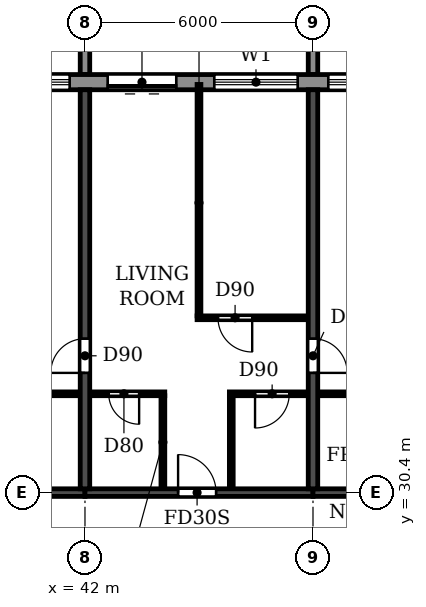
"""IFC4 building model, lengths in metres.
Left out: names, types, materials, properties, quantities, classifications, styles, units other than length and angle.
Written with IfcOpenShell. Run it as: python <this file> out.ifc"""

import sys

from ifc_helpers import new_model, si_unit, direction, frame, frame_2d, origin, place, context, subcontext, project, spatial, polyline, rectangle, outline, extrude, source, transform, mapped, element, fill, save


model = new_model("IFC4")
c1 = context("Model", 3, precision=1e-05, world=origin(), true_north=direction((0.0, 1.0)))
c2 = subcontext(c1, "Body", "Model", "MODEL_VIEW")
j1 = project(units=[si_unit("LENGTHUNIT", "METRE"), si_unit("PLANEANGLEUNIT", "RADIAN")], contexts=[c1])
p1 = place(None, origin())
s1 = spatial("IfcSite", under=j1, at=p1, CompositionType="ELEMENT")
p2 = place(p1, origin())
s2 = spatial("IfcBuilding", under=s1, at=p2, CompositionType="ELEMENT")
p3 = place(p2, frame((0.0, 0.0, 191.7)))
s3 = spatial("IfcBuildingStorey", under=s2, at=p3, CompositionType="ELEMENT", Elevation=191.7)
p4 = place(p3, frame((42.0, 30.5, 0.0), z_axis=(0.0, 0.0, 1.0), x_axis=(0.0, 1.0, 0.0)))
e1 = element("IfcWall", 1, at=p4, inside=s3, PredefinedType="SHEAR", context=c2, shape_type="SweptSolid", body=[
    extrude(rectangle(XDim=10.5, YDim=0.25, at=frame_2d((5.25, 0.0))), origin(), (0.0, 0.0, 1.0), 3.08),
])
p5 = place(p4, frame((3.05, 0.0, 0.0)))
e2 = element("IfcOpeningElement", 2, at=p5, cuts=e1, PredefinedType="OPENING", context=c2, shape_type="SweptSolid", body=[
    extrude(rectangle(XDim=0.9, YDim=2.1, at=frame_2d((0.45, 1.05))), frame((0.0, 0.135, 0.0), z_axis=(0.0, -1.0, 0.0), x_axis=(1.0, 0.0, 0.0)), (0.0, 0.0, 1.0), 0.27),
])
p6 = place(p3, frame((48.0, 30.5, 0.0), z_axis=(0.0, 0.0, 1.0), x_axis=(0.0, 1.0, 0.0)))
e3 = element("IfcWall", 3, at=p6, inside=s3, PredefinedType="SHEAR", context=c2, shape_type="SweptSolid", body=[
    extrude(rectangle(XDim=10.5, YDim=0.25, at=frame_2d((5.25, 0.0))), origin(), (0.0, 0.0, 1.0), 3.08),
])
p7 = place(p6, frame((3.05, 0.0, 0.0)))
e4 = element("IfcOpeningElement", 4, at=p7, cuts=e3, PredefinedType="OPENING", context=c2, shape_type="SweptSolid", body=[
    extrude(rectangle(XDim=0.9, YDim=2.1, at=frame_2d((0.45, 1.05))), frame((0.0, 0.135, 0.0), z_axis=(0.0, -1.0, 0.0), x_axis=(1.0, 0.0, 0.0)), (0.0, 0.0, 1.0), 0.27),
])
p8 = place(p3, frame((36.0, 30.4, 0.0), z_axis=(0.0, 0.0, 1.0), x_axis=(1.0, 0.0, 0.0)))
e5 = element("IfcWall", 5, at=p8, inside=s3, PredefinedType="SHEAR", context=c2, shape_type="SweptSolid", body=[
    extrude(rectangle(XDim=6.0, YDim=0.2, at=frame_2d((3.0, 0.0))), origin(), (0.0, 0.0, 1.0), 2.48),
])
p9 = place(p3, frame((42.0, 30.4, 0.0), z_axis=(0.0, 0.0, 1.0), x_axis=(1.0, 0.0, 0.0)))
e6 = element("IfcWall", 6, at=p9, inside=s3, PredefinedType="SHEAR", context=c2, shape_type="SweptSolid", body=[
    extrude(rectangle(XDim=6.0, YDim=0.2, at=frame_2d((3.0, 0.0))), origin(), (0.0, 0.0, 1.0), 2.48),
])
p10 = place(p9, frame((2.45, 0.0, 0.0)))
e7 = element("IfcOpeningElement", 7, at=p10, cuts=e6, PredefinedType="OPENING", context=c2, shape_type="SweptSolid", body=[
    extrude(rectangle(XDim=1.0, YDim=2.1, at=frame_2d((0.5, 1.05))), frame((0.0, 0.11, 0.0), z_axis=(0.0, -1.0, 0.0), x_axis=(1.0, 0.0, 0.0)), (0.0, 0.0, 1.0), 0.22),
])
p11 = place(p3, frame((48.0, 30.4, 0.0), z_axis=(0.0, 0.0, 1.0), x_axis=(1.0, 0.0, 0.0)))
e8 = element("IfcWall", 8, at=p11, inside=s3, PredefinedType="SHEAR", context=c2, shape_type="SweptSolid", body=[
    extrude(rectangle(XDim=6.0, YDim=0.2, at=frame_2d((3.0, 0.0))), origin(), (0.0, 0.0, 1.0), 2.48),
])
p12 = place(p3, frame((79.317, 41.2, 0.0), z_axis=(0.0, 0.0, 1.0), x_axis=(-1.0, 0.0, 0.0)))
e9 = element("IfcWall", 9, at=p12, inside=s3, PredefinedType="STANDARD", context=c2, shape_type="SweptSolid", body=[
    extrude(rectangle(XDim=56.634, YDim=0.4, at=frame_2d((28.317, 0.0))), origin(), (0.0, 0.0, 1.0), 3.08),
])
p13 = place(p12, frame((52.917, 0.0, 0.0)))
e10 = element("IfcOpeningElement", 10, at=p13, cuts=e9, PredefinedType="OPENING", context=c2, shape_type="SweptSolid", body=[
    extrude(rectangle(XDim=1.8, YDim=2.4, at=frame_2d((0.9, 1.2))), frame((0.0, 0.21, 0.0), z_axis=(0.0, -1.0, 0.0), x_axis=(1.0, 0.0, 0.0)), (0.0, 0.0, 1.0), 0.42),
])
p14 = place(p12, frame((49.717, 0.0, 0.9)))
e11 = element("IfcOpeningElement", 11, at=p14, cuts=e9, PredefinedType="OPENING", context=c2, shape_type="SweptSolid", body=[
    extrude(rectangle(XDim=2.2, YDim=1.5, at=frame_2d((1.1, 0.75))), frame((0.0, 0.21, 0.0), z_axis=(0.0, -1.0, 0.0), x_axis=(1.0, 0.0, 0.0)), (0.0, 0.0, 1.0), 0.42),
])
p15 = place(p12, frame((46.917, 0.0, 0.0)))
e12 = element("IfcOpeningElement", 12, at=p15, cuts=e9, PredefinedType="OPENING", context=c2, shape_type="SweptSolid", body=[
    extrude(rectangle(XDim=1.8, YDim=2.4, at=frame_2d((0.9, 1.2))), frame((0.0, 0.21, 0.0), z_axis=(0.0, -1.0, 0.0), x_axis=(1.0, 0.0, 0.0)), (0.0, 0.0, 1.0), 0.42),
])
p16 = place(p12, frame((43.717, 0.0, 0.9)))
e13 = element("IfcOpeningElement", 13, at=p16, cuts=e9, PredefinedType="OPENING", context=c2, shape_type="SweptSolid", body=[
    extrude(rectangle(XDim=2.2, YDim=1.5, at=frame_2d((1.1, 0.75))), frame((0.0, 0.21, 0.0), z_axis=(0.0, -1.0, 0.0), x_axis=(1.0, 0.0, 0.0)), (0.0, 0.0, 1.0), 0.42),
])
p17 = place(p12, frame((40.717, 0.0, 0.9)))
e14 = element("IfcOpeningElement", 14, at=p17, cuts=e9, PredefinedType="OPENING", context=c2, shape_type="SweptSolid", body=[
    extrude(rectangle(XDim=2.2, YDim=1.5, at=frame_2d((1.1, 0.75))), frame((0.0, 0.21, 0.0), z_axis=(0.0, -1.0, 0.0), x_axis=(1.0, 0.0, 0.0)), (0.0, 0.0, 1.0), 0.42),
])
p18 = place(p12, frame((37.717, 0.0, 0.9)))
e15 = element("IfcOpeningElement", 15, at=p18, cuts=e9, PredefinedType="OPENING", context=c2, shape_type="SweptSolid", body=[
    extrude(rectangle(XDim=2.2, YDim=1.5, at=frame_2d((1.1, 0.75))), frame((0.0, 0.21, 0.0), z_axis=(0.0, -1.0, 0.0), x_axis=(1.0, 0.0, 0.0)), (0.0, 0.0, 1.0), 0.42),
])
p19 = place(p12, frame((34.917, 0.0, 0.0)))
e16 = element("IfcOpeningElement", 16, at=p19, cuts=e9, PredefinedType="OPENING", context=c2, shape_type="SweptSolid", body=[
    extrude(rectangle(XDim=1.8, YDim=2.4, at=frame_2d((0.9, 1.2))), frame((0.0, 0.21, 0.0), z_axis=(0.0, -1.0, 0.0), x_axis=(1.0, 0.0, 0.0)), (0.0, 0.0, 1.0), 0.42),
])
p20 = place(p12, frame((31.717, 0.0, 0.9)))
e17 = element("IfcOpeningElement", 17, at=p20, cuts=e9, PredefinedType="OPENING", context=c2, shape_type="SweptSolid", body=[
    extrude(rectangle(XDim=2.2, YDim=1.5, at=frame_2d((1.1, 0.75))), frame((0.0, 0.21, 0.0), z_axis=(0.0, -1.0, 0.0), x_axis=(1.0, 0.0, 0.0)), (0.0, 0.0, 1.0), 0.42),
])
p21 = place(p12, frame((28.717, 0.0, 0.9)))
e18 = element("IfcOpeningElement", 18, at=p21, cuts=e9, PredefinedType="OPENING", context=c2, shape_type="SweptSolid", body=[
    extrude(rectangle(XDim=2.2, YDim=1.5, at=frame_2d((1.1, 0.75))), frame((0.0, 0.21, 0.0), z_axis=(0.0, -1.0, 0.0), x_axis=(1.0, 0.0, 0.0)), (0.0, 0.0, 1.0), 0.42),
])
p22 = place(p12, frame((25.717, 0.0, 0.9)))
e19 = element("IfcOpeningElement", 19, at=p22, cuts=e9, PredefinedType="OPENING", context=c2, shape_type="SweptSolid", body=[
    extrude(rectangle(XDim=2.2, YDim=1.5, at=frame_2d((1.1, 0.75))), frame((0.0, 0.21, 0.0), z_axis=(0.0, -1.0, 0.0), x_axis=(1.0, 0.0, 0.0)), (0.0, 0.0, 1.0), 0.42),
])
p23 = place(p12, frame((22.917, 0.0, 0.0)))
e20 = element("IfcOpeningElement", 20, at=p23, cuts=e9, PredefinedType="OPENING", context=c2, shape_type="SweptSolid", body=[
    extrude(rectangle(XDim=1.8, YDim=2.4, at=frame_2d((0.9, 1.2))), frame((0.0, 0.21, 0.0), z_axis=(0.0, -1.0, 0.0), x_axis=(1.0, 0.0, 0.0)), (0.0, 0.0, 1.0), 0.42),
])
p24 = place(p12, frame((19.717, 0.0, 0.9)))
e21 = element("IfcOpeningElement", 21, at=p24, cuts=e9, PredefinedType="OPENING", context=c2, shape_type="SweptSolid", body=[
    extrude(rectangle(XDim=2.2, YDim=1.5, at=frame_2d((1.1, 0.75))), frame((0.0, 0.21, 0.0), z_axis=(0.0, -1.0, 0.0), x_axis=(1.0, 0.0, 0.0)), (0.0, 0.0, 1.0), 0.42),
])
p25 = place(p12, frame((16.717, 0.0, 0.9)))
e22 = element("IfcOpeningElement", 22, at=p25, cuts=e9, PredefinedType="OPENING", context=c2, shape_type="SweptSolid", body=[
    extrude(rectangle(XDim=2.2, YDim=1.5, at=frame_2d((1.1, 0.75))), frame((0.0, 0.21, 0.0), z_axis=(0.0, -1.0, 0.0), x_axis=(1.0, 0.0, 0.0)), (0.0, 0.0, 1.0), 0.42),
])
p26 = place(p12, frame((13.717, 0.0, 0.9)))
e23 = element("IfcOpeningElement", 23, at=p26, cuts=e9, PredefinedType="OPENING", context=c2, shape_type="SweptSolid", body=[
    extrude(rectangle(XDim=2.2, YDim=1.5, at=frame_2d((1.1, 0.75))), frame((0.0, 0.21, 0.0), z_axis=(0.0, -1.0, 0.0), x_axis=(1.0, 0.0, 0.0)), (0.0, 0.0, 1.0), 0.42),
])
p27 = place(p12, frame((10.717, 0.0, 0.9)))
e24 = element("IfcOpeningElement", 24, at=p27, cuts=e9, PredefinedType="OPENING", context=c2, shape_type="SweptSolid", body=[
    extrude(rectangle(XDim=2.2, YDim=1.5, at=frame_2d((1.1, 0.75))), frame((0.0, 0.21, 0.0), z_axis=(0.0, -1.0, 0.0), x_axis=(1.0, 0.0, 0.0)), (0.0, 0.0, 1.0), 0.42),
])
p28 = place(p12, frame((7.917, 0.0, 0.0)))
e25 = element("IfcOpeningElement", 25, at=p28, cuts=e9, PredefinedType="OPENING", context=c2, shape_type="SweptSolid", body=[
    extrude(rectangle(XDim=1.8, YDim=2.4, at=frame_2d((0.9, 1.2))), frame((0.0, 0.21, 0.0), z_axis=(0.0, -1.0, 0.0), x_axis=(1.0, 0.0, 0.0)), (0.0, 0.0, 1.0), 0.42),
])
p29 = place(p12, frame((4.717, 0.0, 0.9)))
e26 = element("IfcOpeningElement", 26, at=p29, cuts=e9, PredefinedType="OPENING", context=c2, shape_type="SweptSolid", body=[
    extrude(rectangle(XDim=2.2, YDim=1.5, at=frame_2d((1.1, 0.75))), frame((0.0, 0.21, 0.0), z_axis=(0.0, -1.0, 0.0), x_axis=(1.0, 0.0, 0.0)), (0.0, 0.0, 1.0), 0.42),
])
p30 = place(p12, frame((1.917, 0.0, 0.0)))
e27 = element("IfcOpeningElement", 27, at=p30, cuts=e9, PredefinedType="OPENING", context=c2, shape_type="SweptSolid", body=[
    extrude(rectangle(XDim=1.8, YDim=2.4, at=frame_2d((0.9, 1.2))), frame((0.0, 0.21, 0.0), z_axis=(0.0, -1.0, 0.0), x_axis=(1.0, 0.0, 0.0)), (0.0, 0.0, 1.0), 0.42),
])
m1 = source(origin(), c2, "Body", "SweptSolid", [
    extrude(outline(polyline([(0.0, 0.0), (0.25, 0.0), (0.25, 3.1), (0.0, 3.1), (0.0, 0.0)])), origin(), (0.0, 0.0, 1.0), 3.1),
])
for number, where in (
    (28, (41.875, 41.4, 0.0)),
    (29, (47.875, 41.4, 0.0)),
):
    element("IfcWall", number, at=place(p3, frame(where)), inside=s3, PredefinedType="STANDARD", context=c2, shape_type="MappedRepresentation", body=[
        mapped(m1, transform((0.0, 0.0, 0.0))),
    ])
p31 = place(p3, frame((38.9, 33.0, 0.0), z_axis=(0.0, 0.0, 1.0), x_axis=(1.0, 0.0, 0.0)))
e30 = element("IfcWall", 30, at=p31, inside=s3, PredefinedType="PARTITIONING", context=c2, shape_type="SweptSolid", body=[
    extrude(rectangle(XDim=2.965, YDim=0.1, at=frame_2d((1.482, 0.0))), origin(), (0.0, 0.0, 1.0), 3.08),
])
p32 = place(p31, frame((1.2, 0.0, 0.0)))
e31 = element("IfcOpeningElement", 31, at=p32, cuts=e30, PredefinedType="OPENING", context=c2, shape_type="SweptSolid", body=[
    extrude(rectangle(XDim=0.8, YDim=2.1, at=frame_2d((0.4, 1.05))), frame((0.0, 0.06, 0.0), z_axis=(0.0, -1.0, 0.0), x_axis=(1.0, 0.0, 0.0)), (0.0, 0.0, 1.0), 0.12),
])
p33 = place(p3, frame((42.135, 33.0, 0.0), z_axis=(0.0, 0.0, 1.0), x_axis=(1.0, 0.0, 0.0)))
e32 = element("IfcWall", 32, at=p33, inside=s3, PredefinedType="PARTITIONING", context=c2, shape_type="SweptSolid", body=[
    extrude(rectangle(XDim=1.965, YDim=0.1, at=frame_2d((0.982, 0.0))), origin(), (0.0, 0.0, 1.0), 3.08),
])
p34 = place(p33, frame((0.49, 0.0, 0.0)))
e33 = element("IfcOpeningElement", 33, at=p34, cuts=e32, PredefinedType="OPENING", context=c2, shape_type="SweptSolid", body=[
    extrude(rectangle(XDim=0.8, YDim=2.1, at=frame_2d((0.4, 1.05))), frame((0.0, 0.06, 0.0), z_axis=(0.0, -1.0, 0.0), x_axis=(1.0, 0.0, 0.0)), (0.0, 0.0, 1.0), 0.12),
])
p35 = place(p3, frame((45.8, 33.0, 0.0), z_axis=(0.0, 0.0, 1.0), x_axis=(1.0, 0.0, 0.0)))
e34 = element("IfcWall", 34, at=p35, inside=s3, PredefinedType="PARTITIONING", context=c2, shape_type="SweptSolid", body=[
    extrude(rectangle(XDim=2.065, YDim=0.1, at=frame_2d((1.032, 0.0))), origin(), (0.0, 0.0, 1.0), 3.08),
])
p36 = place(p35, frame((0.675, 0.0, 0.0)))
e35 = element("IfcOpeningElement", 35, at=p36, cuts=e34, PredefinedType="OPENING", context=c2, shape_type="SweptSolid", body=[
    extrude(rectangle(XDim=0.9, YDim=2.1, at=frame_2d((0.45, 1.05))), frame((0.0, 0.06, 0.0), z_axis=(0.0, -1.0, 0.0), x_axis=(1.0, 0.0, 0.0)), (0.0, 0.0, 1.0), 0.12),
])
p37 = place(p3, frame((48.135, 33.0, 0.0), z_axis=(0.0, 0.0, 1.0), x_axis=(1.0, 0.0, 0.0)))
e36 = element("IfcWall", 36, at=p37, inside=s3, PredefinedType="PARTITIONING", context=c2, shape_type="SweptSolid", body=[
    extrude(rectangle(XDim=5.73, YDim=0.1, at=frame_2d((2.865, 0.0))), origin(), (0.0, 0.0, 1.0), 3.08),
])
p38 = place(p37, frame((0.965, 0.0, 0.0)))
e37 = element("IfcOpeningElement", 37, at=p38, cuts=e36, PredefinedType="OPENING", context=c2, shape_type="SweptSolid", body=[
    extrude(rectangle(XDim=0.8, YDim=2.1, at=frame_2d((0.4, 1.05))), frame((0.0, 0.06, 0.0), z_axis=(0.0, -1.0, 0.0), x_axis=(1.0, 0.0, 0.0)), (0.0, 0.0, 1.0), 0.12),
])
p39 = place(p37, frame((3.965, 0.0, 0.0)))
e38 = element("IfcOpeningElement", 38, at=p39, cuts=e36, PredefinedType="OPENING", context=c2, shape_type="SweptSolid", body=[
    extrude(rectangle(XDim=0.8, YDim=2.1, at=frame_2d((0.4, 1.05))), frame((0.0, 0.06, 0.0), z_axis=(0.0, -1.0, 0.0), x_axis=(1.0, 0.0, 0.0)), (0.0, 0.0, 1.0), 0.12),
])
p40 = place(p3, frame((44.95, 35.0, 0.0), z_axis=(0.0, 0.0, 1.0), x_axis=(1.0, 0.0, 0.0)))
e39 = element("IfcWall", 39, at=p40, inside=s3, PredefinedType="PARTITIONING", context=c2, shape_type="SweptSolid", body=[
    extrude(rectangle(XDim=2.915, YDim=0.1, at=frame_2d((1.458, 0.0))), origin(), (0.0, 0.0, 1.0), 3.08),
])
p41 = place(p40, frame((0.55, 0.0, 0.0)))
e40 = element("IfcOpeningElement", 40, at=p41, cuts=e39, PredefinedType="OPENING", context=c2, shape_type="SweptSolid", body=[
    extrude(rectangle(XDim=0.9, YDim=2.1, at=frame_2d((0.45, 1.05))), frame((0.0, 0.06, 0.0), z_axis=(0.0, -1.0, 0.0), x_axis=(1.0, 0.0, 0.0)), (0.0, 0.0, 1.0), 0.12),
])
p42 = place(p3, frame((44.05, 30.51, 0.0), z_axis=(0.0, 0.0, 1.0), x_axis=(0.0, 1.0, 0.0)))
e41 = element("IfcWall", 41, at=p42, inside=s3, PredefinedType="PARTITIONING", context=c2, shape_type="SweptSolid", body=[
    extrude(rectangle(XDim=2.44, YDim=0.1, at=frame_2d((1.22, 0.0))), origin(), (0.0, 0.0, 1.0), 3.08),
])
p43 = place(p3, frame((45.0, 35.05, 0.0), z_axis=(0.0, 0.0, 1.0), x_axis=(0.0, 1.0, 0.0)))
e42 = element("IfcWall", 42, at=p43, inside=s3, PredefinedType="PARTITIONING", context=c2, shape_type="SweptSolid", body=[
    extrude(rectangle(XDim=6.09, YDim=0.1, at=frame_2d((3.045, 0.0))), origin(), (0.0, 0.0, 1.0), 3.08),
])
p44 = place(p3, frame((45.85, 30.51, 0.0), z_axis=(0.0, 0.0, 1.0), x_axis=(0.0, 1.0, 0.0)))
e43 = element("IfcWall", 43, at=p44, inside=s3, PredefinedType="PARTITIONING", context=c2, shape_type="SweptSolid", body=[
    extrude(rectangle(XDim=2.44, YDim=0.1, at=frame_2d((1.22, 0.0))), origin(), (0.0, 0.0, 1.0), 3.08),
])
p45 = place(p18, origin())
e44 = element("IfcWindow", 44, at=p45, inside=s3, PartitioningType="DOUBLE_PANEL_HORIZONTAL", PredefinedType="WINDOW", context=c2, shape_type="SweptSolid", body=[
    extrude(rectangle(XDim=2.2, YDim=1.5, at=frame_2d((1.1, 0.75))), frame((0.0, 0.03, 0.0), z_axis=(0.0, -1.0, 0.0), x_axis=(1.0, 0.0, 0.0)), (0.0, 0.0, 1.0), 0.06),
])
fill(e15, e44)
p46 = place(p19, origin())
e45 = element("IfcDoor", 45, at=p46, inside=s3, OperationType="DOUBLE_DOOR_SLIDING", PredefinedType="DOOR", context=c2, shape_type="SweptSolid", body=[
    extrude(rectangle(XDim=1.8, YDim=2.4, at=frame_2d((0.9, 1.2))), frame((0.0, 0.025, 0.0), z_axis=(0.0, -1.0, 0.0), x_axis=(1.0, 0.0, 0.0)), (0.0, 0.0, 1.0), 0.05),
])
fill(e16, e45)
p47 = place(p20, origin())
e46 = element("IfcWindow", 46, at=p47, inside=s3, PartitioningType="DOUBLE_PANEL_HORIZONTAL", PredefinedType="WINDOW", context=c2, shape_type="SweptSolid", body=[
    extrude(rectangle(XDim=2.2, YDim=1.5, at=frame_2d((1.1, 0.75))), frame((0.0, 0.03, 0.0), z_axis=(0.0, -1.0, 0.0), x_axis=(1.0, 0.0, 0.0)), (0.0, 0.0, 1.0), 0.06),
])
fill(e17, e46)
p48 = place(p21, origin())
e47 = element("IfcWindow", 47, at=p48, inside=s3, PartitioningType="DOUBLE_PANEL_HORIZONTAL", PredefinedType="WINDOW", context=c2, shape_type="SweptSolid", body=[
    extrude(rectangle(XDim=2.2, YDim=1.5, at=frame_2d((1.1, 0.75))), frame((0.0, 0.03, 0.0), z_axis=(0.0, -1.0, 0.0), x_axis=(1.0, 0.0, 0.0)), (0.0, 0.0, 1.0), 0.06),
])
fill(e18, e47)
p49 = place(p5, origin())
e48 = element("IfcDoor", 48, at=p49, inside=s3, OperationType="SINGLE_SWING_LEFT", PredefinedType="DOOR", context=c2, shape_type="SweptSolid", body=[
    extrude(rectangle(XDim=0.9, YDim=2.1, at=frame_2d((0.45, 1.05))), frame((0.0, 0.025, 0.0), z_axis=(0.0, -1.0, 0.0), x_axis=(1.0, 0.0, 0.0)), (0.0, 0.0, 1.0), 0.05),
])
fill(e2, e48)
p50 = place(p34, frame((0.8, 0.0, 0.0), z_axis=(0.0, 0.0, 1.0), x_axis=(-1.0, 0.0, 0.0)))
e49 = element("IfcDoor", 49, at=p50, inside=s3, OperationType="SINGLE_SWING_LEFT", PredefinedType="DOOR", context=c2, shape_type="SweptSolid", body=[
    extrude(rectangle(XDim=0.8, YDim=2.1, at=frame_2d((0.4, 1.05))), frame((0.0, 0.025, 0.0), z_axis=(0.0, -1.0, 0.0), x_axis=(1.0, 0.0, 0.0)), (0.0, 0.0, 1.0), 0.05),
])
fill(e33, e49)
p51 = place(p10, origin())
e50 = element("IfcDoor", 50, at=p51, inside=s3, OperationType="SINGLE_SWING_LEFT", PredefinedType="DOOR", context=c2, shape_type="SweptSolid", body=[
    extrude(rectangle(XDim=1.0, YDim=2.1, at=frame_2d((0.5, 1.05))), frame((0.0, 0.025, 0.0), z_axis=(0.0, -1.0, 0.0), x_axis=(1.0, 0.0, 0.0)), (0.0, 0.0, 1.0), 0.05),
])
fill(e7, e50)
p52 = place(p41, frame((0.9, 0.0, 0.0), z_axis=(0.0, 0.0, 1.0), x_axis=(-1.0, 0.0, 0.0)))
e51 = element("IfcDoor", 51, at=p52, inside=s3, OperationType="SINGLE_SWING_LEFT", PredefinedType="DOOR", context=c2, shape_type="SweptSolid", body=[
    extrude(rectangle(XDim=0.9, YDim=2.1, at=frame_2d((0.45, 1.05))), frame((0.0, 0.025, 0.0), z_axis=(0.0, -1.0, 0.0), x_axis=(1.0, 0.0, 0.0)), (0.0, 0.0, 1.0), 0.05),
])
fill(e40, e51)
p53 = place(p36, frame((0.9, 0.0, 0.0), z_axis=(0.0, 0.0, 1.0), x_axis=(-1.0, 0.0, 0.0)))
e52 = element("IfcDoor", 52, at=p53, inside=s3, OperationType="SINGLE_SWING_RIGHT", PredefinedType="DOOR", context=c2, shape_type="SweptSolid", body=[
    extrude(rectangle(XDim=0.9, YDim=2.1, at=frame_2d((0.45, 1.05))), frame((0.0, 0.025, 0.0), z_axis=(0.0, -1.0, 0.0), x_axis=(1.0, 0.0, 0.0)), (0.0, 0.0, 1.0), 0.05),
])
fill(e35, e52)
p54 = place(p7, frame((0.9, 0.0, 0.0), z_axis=(0.0, 0.0, 1.0), x_axis=(-1.0, 0.0, 0.0)))
e53 = element("IfcDoor", 53, at=p54, inside=s3, OperationType="SINGLE_SWING_RIGHT", PredefinedType="DOOR", context=c2, shape_type="SweptSolid", body=[
    extrude(rectangle(XDim=0.9, YDim=2.1, at=frame_2d((0.45, 1.05))), frame((0.0, 0.025, 0.0), z_axis=(0.0, -1.0, 0.0), x_axis=(1.0, 0.0, 0.0)), (0.0, 0.0, 1.0), 0.05),
])
fill(e4, e53)
save(model, sys.argv[1])
